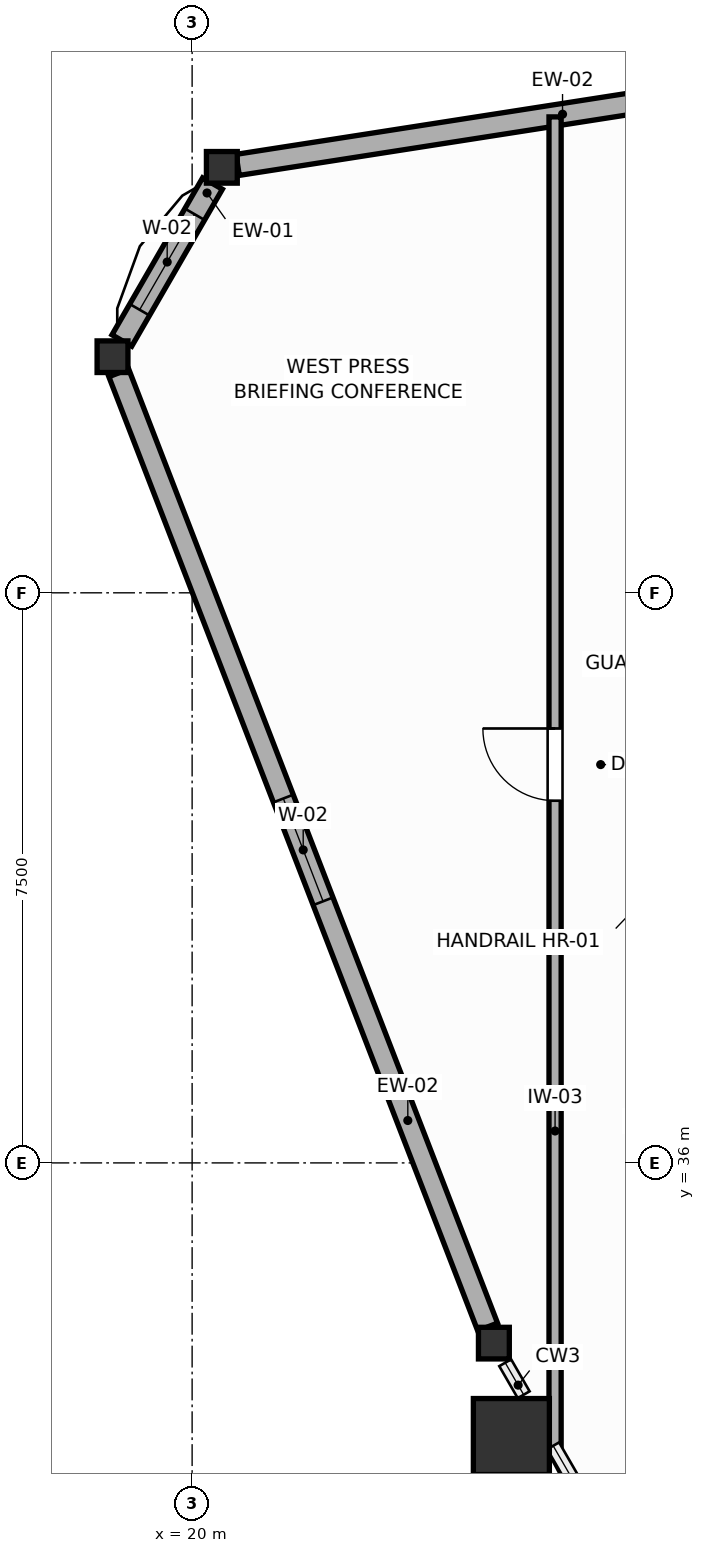
"""IFC4 building model, lengths in metres.
Left out: names, types, materials, properties, quantities, classifications, styles, units other than length and angle.
Written with IfcOpenShell. Run it as: python <this file> out.ifc"""

import sys

from ifc_helpers import new_model, si_unit, direction, frame, frame_2d, origin, origin_2d, place, context, subcontext, project, spatial, rectangle, i_section, extrude, source, transform, mapped, element, fill, save


model = new_model("IFC4")
c1 = context("Model", 3, precision=1e-05, world=origin(), true_north=direction((0.0, 1.0)))
c2 = subcontext(c1, "Body", "Model", "MODEL_VIEW")
j1 = project(units=[si_unit("LENGTHUNIT", "METRE"), si_unit("PLANEANGLEUNIT", "RADIAN")], contexts=[c1])
p1 = place(None, origin())
s1 = spatial("IfcSite", under=j1, at=p1, CompositionType="ELEMENT")
p2 = place(p1, origin())
s2 = spatial("IfcBuilding", under=s1, at=p2, CompositionType="ELEMENT")
p3 = place(p2, frame((0.0, 0.0, 231.0)))
s3 = spatial("IfcBuildingStorey", under=s2, at=p3, CompositionType="ELEMENT", Elevation=231.0)
m1 = source(origin(), c2, "Body", "SweptSolid", [
    extrude(rectangle(XDim=1.0, YDim=1.0, at=origin_2d()), origin(), (0.0, 0.0, 1.0), 3.6),
])
p4 = place(p3, frame((24.2, 32.4, 0.0), z_axis=(0.0, 0.0, 1.0), x_axis=(1.0, 0.0, 0.0)))
e1 = element("IfcColumn", 1, at=p4, inside=s3, PredefinedType="COLUMN", context=c2, shape_type="MappedRepresentation", body=[
    mapped(m1, transform((0.0, 0.0, 0.0), scale=1.0)),
])
m2 = source(origin(), c2, "Body", "SweptSolid", [
    extrude(i_section(OverallWidth=0.406, OverallDepth=0.416, WebThickness=0.027, FlangeThickness=0.044, FilletRadius=0.015, at=origin_2d()), origin(), (0.0, 0.0, 1.0), 3.6),
])
for number, where, z_axis, x_axis in (
    (2, (20.391, 49.098, 0.0), (0.0, 0.0, 1.0), (1.0, 0.0, 0.0)),
    (3, (18.953, 46.606, 0.0), (0.0, 0.0, 1.0), (1.0, 0.0, 0.0)),
    (4, (23.97, 33.629, 0.0), (0.0, 0.0, 1.0), (1.0, 0.0, 0.0)),
):
    element("IfcColumn", number, at=place(p3, frame(where, z_axis=z_axis, x_axis=x_axis)), inside=s3, PredefinedType="COLUMN", context=c2, shape_type="MappedRepresentation", body=[
        mapped(m2, transform((0.0, 0.0, 0.0), scale=1.0)),
    ])
p5 = place(p3, frame((33.93, 51.209, 0.0), z_axis=(0.0, 0.0, 1.0), x_axis=(-0.988058563106, -0.154078797613, 0.0)))
e5 = element("IfcWall", 5, at=p5, inside=s3, PredefinedType="SOLIDWALL", context=c2, shape_type="SweptSolid", body=[
    extrude(rectangle(XDim=13.492, YDim=0.28, at=frame_2d((6.746, 0.0))), origin(), (0.0, 0.0, 1.0), 2.96),
])
p6 = place(p5, frame((3.211, 0.0, 0.75)))
e6 = element("IfcOpeningElement", 6, at=p6, cuts=e5, PredefinedType="OPENING", context=c2, shape_type="SweptSolid", body=[
    extrude(rectangle(XDim=1.45, YDim=1.65, at=frame_2d((0.725, 0.825))), frame((0.0, 0.15, 0.0), z_axis=(0.0, -1.0, 0.0), x_axis=(1.0, 0.0, 0.0)), (0.0, 0.0, 1.0), 0.3),
])
p7 = place(p3, frame((20.268, 48.885, 0.0), z_axis=(0.0, 0.0, 1.0), x_axis=(-0.500014901547, -0.866016800201, 0.0)))
e7 = element("IfcWall", 7, at=p7, inside=s3, PredefinedType="SOLIDWALL", context=c2, shape_type="SweptSolid", body=[
    extrude(rectangle(XDim=2.385, YDim=0.3, at=frame_2d((1.192, 0.0))), origin(), (0.0, 0.0, 1.0), 3.02),
])
p8 = place(p7, frame((0.467, 0.0, 0.75)))
e8 = element("IfcOpeningElement", 8, at=p8, cuts=e7, PredefinedType="OPENING", context=c2, shape_type="SweptSolid", body=[
    extrude(rectangle(XDim=1.45, YDim=1.65, at=frame_2d((0.725, 0.825))), frame((0.0, 0.16, 0.0), z_axis=(0.0, -1.0, 0.0), x_axis=(1.0, 0.0, 0.0)), (0.0, 0.0, 1.0), 0.32),
])
p9 = place(p3, frame((19.035, 46.393, 0.0), z_axis=(0.0, 0.0, 1.0), x_axis=(0.360620992305, -0.93271244224, 0.0)))
e9 = element("IfcWall", 9, at=p9, inside=s3, PredefinedType="SOLIDWALL", context=c2, shape_type="SweptSolid", body=[
    extrude(rectangle(XDim=13.457, YDim=0.28, at=frame_2d((6.729, 0.0))), origin(), (0.0, 0.0, 1.0), 3.02),
])
p10 = place(p9, frame((6.003, 0.0, 0.75)))
e10 = element("IfcOpeningElement", 10, at=p10, cuts=e9, PredefinedType="OPENING", context=c2, shape_type="SweptSolid", body=[
    extrude(rectangle(XDim=1.45, YDim=1.65, at=frame_2d((0.725, 0.825))), frame((0.0, 0.15, 0.0), z_axis=(0.0, -1.0, 0.0), x_axis=(1.0, 0.0, 0.0)), (0.0, 0.0, 1.0), 0.3),
])
p11 = place(p3, frame((24.775, 32.255, 0.0), z_axis=(0.0, 0.0, 1.0), x_axis=(0.0, 1.0, 0.0)))
e11 = element("IfcWall", 11, at=p11, inside=s3, PredefinedType="PARTITIONING", context=c2, shape_type="SweptSolid", body=[
    extrude(rectangle(XDim=17.507, YDim=0.16, at=frame_2d((8.753, 0.0))), origin(), (0.0, 0.0, 1.0), 3.41),
])
p12 = place(p11, frame((8.51, 0.0, 0.0)))
e12 = element("IfcOpeningElement", 12, at=p12, cuts=e11, PredefinedType="OPENING", context=c2, shape_type="SweptSolid", body=[
    extrude(rectangle(XDim=0.95, YDim=2.05, at=frame_2d((0.475, 1.025))), frame((0.0, 0.09, 0.0), z_axis=(0.0, -1.0, 0.0), x_axis=(1.0, 0.0, 0.0)), (0.0, 0.0, 1.0), 0.18),
])
p13 = place(p8, origin())
e13 = element("IfcWindow", 13, at=p13, inside=s3, PartitioningType="SINGLE_PANEL", PredefinedType="WINDOW", context=c2, shape_type="SweptSolid", body=[
    extrude(rectangle(XDim=1.45, YDim=1.65, at=frame_2d((0.725, 0.825))), frame((0.0, 0.03, 0.0), z_axis=(0.0, -1.0, 0.0), x_axis=(1.0, 0.0, 0.0)), (0.0, 0.0, 1.0), 0.06),
])
fill(e8, e13)
p14 = place(p10, origin())
e14 = element("IfcWindow", 14, at=p14, inside=s3, PartitioningType="SINGLE_PANEL", PredefinedType="WINDOW", context=c2, shape_type="SweptSolid", body=[
    extrude(rectangle(XDim=1.45, YDim=1.65, at=frame_2d((0.725, 0.825))), frame((0.0, 0.03, 0.0), z_axis=(0.0, -1.0, 0.0), x_axis=(1.0, 0.0, 0.0)), (0.0, 0.0, 1.0), 0.06),
])
fill(e10, e14)
p15 = place(p12, origin())
e15 = element("IfcDoor", 15, at=p15, inside=s3, OperationType="SINGLE_SWING_RIGHT", PredefinedType="DOOR", context=c2, shape_type="SweptSolid", body=[
    extrude(rectangle(XDim=0.95, YDim=2.05, at=frame_2d((0.475, 1.025))), frame((0.0, 0.025, 0.0), z_axis=(0.0, -1.0, 0.0), x_axis=(1.0, 0.0, 0.0)), (0.0, 0.0, 1.0), 0.05),
])
fill(e12, e15)
save(model, sys.argv[1])
